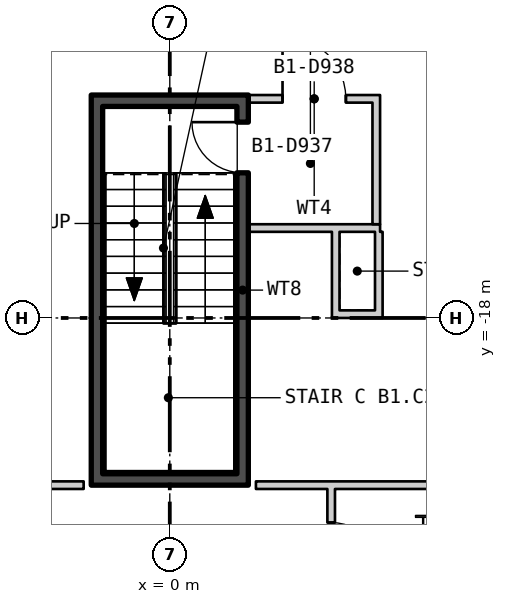
"""IFC4 building model, lengths in metres.
Left out: names, types, materials, properties, quantities, classifications, styles, units other than length and angle.
Written with IfcOpenShell. Run it as: python <this file> out.ifc"""

import sys

from ifc_helpers import new_model, si_unit, direction, frame, frame_2d, origin, origin_2d, place, context, subcontext, project, spatial, rectangle, i_section, extrude, element, fill, save


model = new_model("IFC4")
c1 = context("Model", 3, precision=1e-05, world=origin(), true_north=direction((0.0, 1.0)))
c2 = subcontext(c1, "Body", "Model", "MODEL_VIEW")
j1 = project(units=[si_unit("LENGTHUNIT", "METRE"), si_unit("PLANEANGLEUNIT", "RADIAN")], contexts=[c1])
p1 = place(None, origin())
s1 = spatial("IfcSite", under=j1, at=p1, CompositionType="ELEMENT")
p2 = place(p1, origin())
s2 = spatial("IfcBuilding", under=s1, at=p2, CompositionType="ELEMENT")
p3 = place(p2, frame((0.0, 0.0, -5.7)))
s3 = spatial("IfcBuildingStorey", under=s2, at=p3, CompositionType="ELEMENT", Elevation=-5.7)
p4 = place(p3, frame((5.0, -22.4, 0.0), z_axis=(0.0, 0.0, 1.0), x_axis=(1.0, 0.0, 0.0)))
e1 = element("IfcColumn", 1, at=p4, inside=s3, PredefinedType="COLUMN", context=c2, shape_type="SweptSolid", body=[
    extrude(i_section(OverallWidth=0.302, OverallDepth=1.008, WebThickness=0.021, FlangeThickness=0.04, at=origin_2d()), origin(), (0.0, 0.0, 1.0), 5.7),
])
p5 = place(p3, frame((-1.438, -21.075, 0.0), z_axis=(0.0, 0.0, 1.0), x_axis=(0.0, 1.0, 0.0)))
e2 = element("IfcWall", 2, at=p5, inside=s3, PredefinedType="SHEAR", context=c2, shape_type="SweptSolid", body=[
    extrude(rectangle(XDim=7.25, YDim=0.225, at=frame_2d((3.625, 0.0))), origin(), (0.0, 0.0, 1.0), 5.25),
])
p6 = place(p3, frame((1.438, -21.075, 0.0), z_axis=(0.0, 0.0, 1.0), x_axis=(0.0, 1.0, 0.0)))
e3 = element("IfcWall", 3, at=p6, inside=s3, PredefinedType="SHEAR", context=c2, shape_type="SweptSolid", body=[
    extrude(rectangle(XDim=7.25, YDim=0.225, at=frame_2d((3.625, 0.0))), origin(), (0.0, 0.0, 1.0), 5.25),
])
p7 = place(p6, frame((5.94, 0.0, 0.0)))
e4 = element("IfcOpeningElement", 4, at=p7, cuts=e3, PredefinedType="OPENING", context=c2, shape_type="SweptSolid", body=[
    extrude(rectangle(XDim=1.0, YDim=2.1, at=frame_2d((0.5, 1.05))), frame((0.0, 0.122, 0.0), z_axis=(0.0, -1.0, 0.0), x_axis=(1.0, 0.0, 0.0)), (0.0, 0.0, 1.0), 0.245),
])
for number, where, z_axis, x_axis in (
    (5, (-1.55, -21.188, 0.0), (0.0, 0.0, 1.0), (1.0, 0.0, 0.0)),
    (6, (-1.55, -13.713, 0.0), (0.0, 0.0, 1.0), (1.0, 0.0, 0.0)),
):
    element("IfcWall", number, at=place(p3, frame(where, z_axis=z_axis, x_axis=x_axis)), inside=s3, PredefinedType="SHEAR", context=c2, shape_type="SweptSolid", body=[
        extrude(rectangle(XDim=3.1, YDim=0.225, at=frame_2d((1.55, 0.0))), origin(), (0.0, 0.0, 1.0), 5.25),
    ])
p8 = place(p3, frame((1.55, -16.225, 0.0), z_axis=(0.0, 0.0, 1.0), x_axis=(1.0, 0.0, 0.0)))
e7 = element("IfcWall", 7, at=p8, inside=s3, PredefinedType="PARTITIONING", context=c2, shape_type="SweptSolid", body=[
    extrude(rectangle(XDim=2.6, YDim=0.15, at=frame_2d((1.3, 0.0))), origin(), (0.0, 0.0, 1.0), 5.25),
])
p9 = place(p3, frame((4.075, -16.15, 0.0), z_axis=(0.0, 0.0, 1.0), x_axis=(0.0, 1.0, 0.0)))
e8 = element("IfcWall", 8, at=p9, inside=s3, PredefinedType="PARTITIONING", context=c2, shape_type="SweptSolid", body=[
    extrude(rectangle(XDim=2.4, YDim=0.15, at=frame_2d((1.2, 0.0))), origin(), (0.0, 0.0, 1.0), 5.25),
])
p10 = place(p3, frame((1.55, -13.675, 0.0), z_axis=(0.0, 0.0, 1.0), x_axis=(1.0, 0.0, 0.0)))
e9 = element("IfcWall", 9, at=p10, inside=s3, PredefinedType="PARTITIONING", context=c2, shape_type="SweptSolid", body=[
    extrude(rectangle(XDim=2.6, YDim=0.15, at=frame_2d((1.3, 0.0))), origin(), (0.0, 0.0, 1.0), 5.25),
])
p11 = place(p10, frame((0.675, 0.0, 0.0)))
e10 = element("IfcOpeningElement", 10, at=p11, cuts=e9, PredefinedType="OPENING", context=c2, shape_type="SweptSolid", body=[
    extrude(rectangle(XDim=1.25, YDim=2.1, at=frame_2d((0.625, 1.05))), frame((0.0, 0.085, 0.0), z_axis=(0.0, -1.0, 0.0), x_axis=(1.0, 0.0, 0.0)), (0.0, 0.0, 1.0), 0.17),
])
p12 = place(p3, frame((3.275, -18.0, 0.0), z_axis=(0.0, 0.0, 1.0), x_axis=(0.0, 1.0, 0.0)))
e11 = element("IfcWall", 11, at=p12, inside=s3, PredefinedType="PARTITIONING", context=c2, shape_type="SweptSolid", body=[
    extrude(rectangle(XDim=1.7, YDim=0.15, at=frame_2d((0.85, 0.0))), origin(), (0.0, 0.0, 1.0), 5.25),
])
p13 = place(p3, frame((3.35, -17.925, 0.0), z_axis=(0.0, 0.0, 1.0), x_axis=(1.0, 0.0, 0.0)))
e12 = element("IfcWall", 12, at=p13, inside=s3, PredefinedType="PARTITIONING", context=c2, shape_type="SweptSolid", body=[
    extrude(rectangle(XDim=0.7, YDim=0.15, at=frame_2d((0.35, 0.0))), origin(), (0.0, 0.0, 1.0), 5.25),
])
p14 = place(p3, frame((4.125, -18.0, 0.0), z_axis=(0.0, 0.0, 1.0), x_axis=(0.0, 1.0, 0.0)))
e13 = element("IfcWall", 13, at=p14, inside=s3, PredefinedType="PARTITIONING", context=c2, shape_type="SweptSolid", body=[
    extrude(rectangle(XDim=1.7, YDim=0.15, at=frame_2d((0.85, 0.0))), origin(), (0.0, 0.0, 1.0), 5.25),
])
p15 = place(p3, frame((-6.361, -21.3, 0.0), z_axis=(0.0, 0.0, 1.0), x_axis=(1.0, 0.0, 0.0)))
e14 = element("IfcWall", 14, at=p15, inside=s3, PredefinedType="PARTITIONING", context=c2, shape_type="SweptSolid", body=[
    extrude(rectangle(XDim=4.661, YDim=0.15, at=frame_2d((2.33, 0.0))), origin(), (0.0, 0.0, 1.0), 5.25),
])
p16 = place(p3, frame((1.7, -21.3, 0.0), z_axis=(0.0, 0.0, 1.0), x_axis=(1.0, 0.0, 0.0)))
e15 = element("IfcWall", 15, at=p16, inside=s3, PredefinedType="PARTITIONING", context=c2, shape_type="SweptSolid", body=[
    extrude(rectangle(XDim=15.325, YDim=0.15, at=frame_2d((7.662, 0.0))), origin(), (0.0, 0.0, 1.0), 5.25),
])
p17 = place(p3, frame((3.185, -23.7, 0.0), z_axis=(0.0, 0.0, 1.0), x_axis=(0.0, 1.0, 0.0)))
e16 = element("IfcWall", 16, at=p17, inside=s3, PredefinedType="PARTITIONING", context=c2, shape_type="SweptSolid", body=[
    extrude(rectangle(XDim=2.325, YDim=0.15, at=frame_2d((1.163, 0.0))), origin(), (0.0, 0.0, 1.0), 5.25),
])
p18 = place(p17, frame((0.662, 0.0, 0.0)))
e17 = element("IfcOpeningElement", 17, at=p18, cuts=e16, PredefinedType="OPENING", context=c2, shape_type="SweptSolid", body=[
    extrude(rectangle(XDim=1.0, YDim=2.1, at=frame_2d((0.5, 1.05))), frame((0.0, 0.085, 0.0), z_axis=(0.0, -1.0, 0.0), x_axis=(1.0, 0.0, 0.0)), (0.0, 0.0, 1.0), 0.17),
])
p19 = place(p7, origin())
e18 = element("IfcDoor", 18, at=p19, inside=s3, OperationType="SINGLE_SWING_LEFT", PredefinedType="DOOR", context=c2, shape_type="SweptSolid", body=[
    extrude(rectangle(XDim=1.0, YDim=2.1, at=frame_2d((0.5, 1.05))), frame((0.0, 0.025, 0.0), z_axis=(0.0, -1.0, 0.0), x_axis=(1.0, 0.0, 0.0)), (0.0, 0.0, 1.0), 0.05),
])
fill(e4, e18)
p20 = place(p11, origin())
e19 = element("IfcDoor", 19, at=p20, inside=s3, OperationType="SINGLE_SWING_RIGHT", PredefinedType="DOOR", context=c2, shape_type="SweptSolid", body=[
    extrude(rectangle(XDim=1.25, YDim=2.1, at=frame_2d((0.625, 1.05))), frame((0.0, 0.025, 0.0), z_axis=(0.0, -1.0, 0.0), x_axis=(1.0, 0.0, 0.0)), (0.0, 0.0, 1.0), 0.05),
])
fill(e10, e19)
p21 = place(p18, origin())
e20 = element("IfcDoor", 20, at=p21, inside=s3, OperationType="SINGLE_SWING_LEFT", PredefinedType="DOOR", context=c2, shape_type="SweptSolid", body=[
    extrude(rectangle(XDim=1.0, YDim=2.1, at=frame_2d((0.5, 1.05))), frame((0.0, 0.025, 0.0), z_axis=(0.0, -1.0, 0.0), x_axis=(1.0, 0.0, 0.0)), (0.0, 0.0, 1.0), 0.05),
])
fill(e17, e20)
save(model, sys.argv[1])
